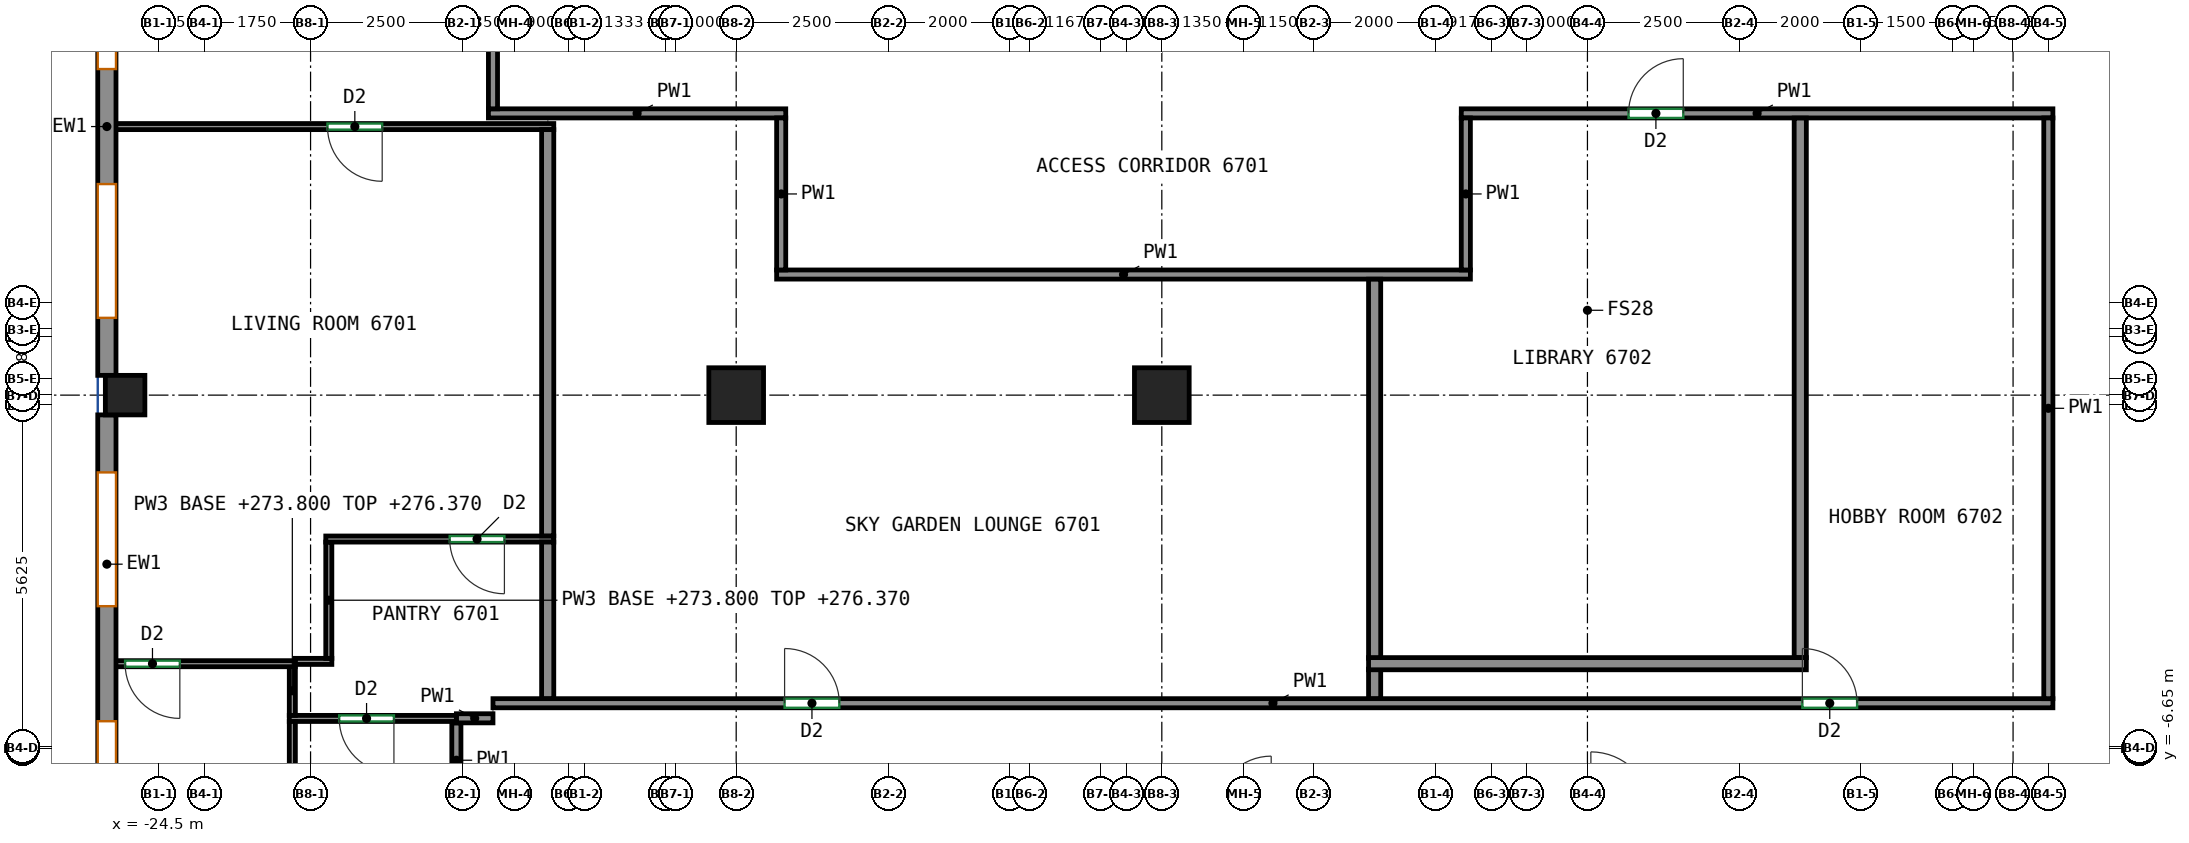
"""IFC4 building model, lengths in metres.
Left out: names, types, materials, properties, quantities, classifications, styles, units other than length and angle.
Written with IfcOpenShell. Run it as: python <this file> out.ifc"""

import sys

from ifc_helpers import new_model, si_unit, direction, frame, frame_2d, origin, origin_2d, place, context, subcontext, project, spatial, rectangle, extrude, source, transform, mapped, element, fill, save


model = new_model("IFC4")
c1 = context("Model", 3, precision=1e-05, world=origin(), true_north=direction((0.0, 1.0)))
c2 = subcontext(c1, "Body", "Model", "MODEL_VIEW")
j1 = project(units=[si_unit("LENGTHUNIT", "METRE"), si_unit("PLANEANGLEUNIT", "RADIAN")], contexts=[c1])
p1 = place(None, origin())
s1 = spatial("IfcSite", under=j1, at=p1, CompositionType="ELEMENT")
p2 = place(p1, origin())
s2 = spatial("IfcBuilding", under=s1, at=p2, CompositionType="ELEMENT")
p3 = place(p2, frame((0.0, 0.0, 273.8)))
s3 = spatial("IfcBuildingStorey", under=s2, at=p3, CompositionType="ELEMENT", Elevation=273.8)
m1 = source(origin(), c2, "Body", "SweptSolid", [
    extrude(rectangle(XDim=0.65, YDim=0.65, at=origin_2d()), origin(), (0.0, 0.0, 1.0), 3.12),
])
p4 = place(p3, frame((-25.05, -0.833, 0.0), z_axis=(0.0, 0.0, 1.0), x_axis=(1.0, 0.0, 0.0)))
e1 = element("IfcColumn", 1, at=p4, inside=s3, PredefinedType="COLUMN", context=c2, shape_type="MappedRepresentation", body=[
    mapped(m1, transform((0.0, 0.0, 0.0))),
])
m2 = source(origin(), c2, "Body", "SweptSolid", [
    extrude(rectangle(XDim=0.9, YDim=0.9, at=origin_2d()), origin(), (0.0, 0.0, 1.0), 3.12),
])
for number, where, z_axis, x_axis in (
    (2, (-15.0, -0.833, 0.0), (0.0, 0.0, 1.0), (1.0, 0.0, 0.0)),
    (3, (-8.0, -0.833, 0.0), (0.0, 0.0, 1.0), (1.0, 0.0, 0.0)),
):
    element("IfcColumn", number, at=place(p3, frame(where, z_axis=z_axis, x_axis=x_axis)), inside=s3, PredefinedType="COLUMN", context=c2, shape_type="MappedRepresentation", body=[
        mapped(m2, transform((0.0, 0.0, 0.0))),
    ])
m3 = source(origin(), c2, "Body", "SweptSolid", [
    extrude(rectangle(XDim=8.183, YDim=0.3, at=frame_2d((4.092, 0.0))), origin(), (0.0, 0.0, 1.0), 3.12),
])
p5 = place(p3, frame((-25.35, 7.675, 0.0), z_axis=(0.0, 0.0, 1.0), x_axis=(0.0, -1.0, 0.0)))
e4 = element("IfcWall", 4, at=p5, inside=s3, PredefinedType="SOLIDWALL", context=c2, shape_type="MappedRepresentation", body=[
    mapped(m3, transform((0.0, 0.0, 0.0))),
])
p6 = place(p5, frame((0.946, 0.0, 0.8)))
e5 = element("IfcOpeningElement", 5, at=p6, cuts=e4, PredefinedType="OPENING", context=c2, shape_type="SweptSolid", body=[
    extrude(rectangle(XDim=2.2, YDim=2.05, at=frame_2d((1.1, 1.025))), frame((0.0, 0.16, 0.0), z_axis=(0.0, -1.0, 0.0), x_axis=(1.0, 0.0, 0.0)), (0.0, 0.0, 1.0), 0.32),
])
p7 = place(p5, frame((5.037, 0.0, 0.8)))
e6 = element("IfcOpeningElement", 6, at=p7, cuts=e4, PredefinedType="OPENING", context=c2, shape_type="SweptSolid", body=[
    extrude(rectangle(XDim=2.2, YDim=2.05, at=frame_2d((1.1, 1.025))), frame((0.0, 0.16, 0.0), z_axis=(0.0, -1.0, 0.0), x_axis=(1.0, 0.0, 0.0)), (0.0, 0.0, 1.0), 0.32),
])
m4 = source(origin(), c2, "Body", "SweptSolid", [
    extrude(rectangle(XDim=8.184, YDim=0.3, at=frame_2d((4.092, 0.0))), origin(), (0.0, 0.0, 1.0), 3.12),
])
p8 = place(p3, frame((-25.35, -1.158, 0.0), z_axis=(0.0, 0.0, 1.0), x_axis=(0.0, -1.0, 0.0)))
e7 = element("IfcWall", 7, at=p8, inside=s3, PredefinedType="SOLIDWALL", context=c2, shape_type="MappedRepresentation", body=[
    mapped(m4, transform((0.0, 0.0, 0.0))),
])
p9 = place(p8, frame((0.946, 0.0, 0.8)))
e8 = element("IfcOpeningElement", 8, at=p9, cuts=e7, PredefinedType="OPENING", context=c2, shape_type="SweptSolid", body=[
    extrude(rectangle(XDim=2.2, YDim=2.05, at=frame_2d((1.1, 1.025))), frame((0.0, 0.16, 0.0), z_axis=(0.0, -1.0, 0.0), x_axis=(1.0, 0.0, 0.0)), (0.0, 0.0, 1.0), 0.32),
])
p10 = place(p8, frame((5.038, 0.0, 0.8)))
e9 = element("IfcOpeningElement", 9, at=p10, cuts=e7, PredefinedType="OPENING", context=c2, shape_type="SweptSolid", body=[
    extrude(rectangle(XDim=2.2, YDim=2.05, at=frame_2d((1.1, 1.025))), frame((0.0, 0.16, 0.0), z_axis=(0.0, -1.0, 0.0), x_axis=(1.0, 0.0, 0.0)), (0.0, 0.0, 1.0), 0.32),
])
p11 = place(p3, frame((-19.602, -7.452, 0.0), z_axis=(0.0, 0.0, 1.0), x_axis=(0.0, 1.0, 0.0)))
e10 = element("IfcWall", 10, at=p11, inside=s3, PredefinedType="PARTITIONING", context=c2, shape_type="SweptSolid", body=[
    extrude(rectangle(XDim=1.229, YDim=0.15, at=frame_2d((0.615, 0.0))), origin(), (0.0, 0.0, 1.0), 3.12),
])
p12 = place(p3, frame((-19.0, -6.148, 0.0), z_axis=(0.0, 0.0, 1.0), x_axis=(-1.0, 0.0, 0.0)))
e11 = element("IfcWall", 11, at=p12, inside=s3, PredefinedType="PARTITIONING", context=c2, shape_type="SweptSolid", body=[
    extrude(rectangle(XDim=0.602, YDim=0.15, at=frame_2d((0.301, 0.0))), origin(), (0.0, 0.0, 1.0), 3.12),
])
p13 = place(p3, frame((-19.0, -5.9, 0.0), z_axis=(0.0, 0.0, 1.0), x_axis=(1.0, 0.0, 0.0)))
e12 = element("IfcWall", 12, at=p13, inside=s3, PredefinedType="PARTITIONING", context=c2, shape_type="SweptSolid", body=[
    extrude(rectangle(XDim=25.655, YDim=0.15, at=frame_2d((12.828, 0.0))), origin(), (0.0, 0.0, 1.0), 3.12),
])
p14 = place(p13, frame((4.796, 0.0, 0.0)))
e13 = element("IfcOpeningElement", 13, at=p14, cuts=e12, PredefinedType="OPENING", context=c2, shape_type="SweptSolid", body=[
    extrude(rectangle(XDim=0.9, YDim=2.1, at=frame_2d((0.45, 1.05))), frame((0.0, 0.085, 0.0), z_axis=(0.0, -1.0, 0.0), x_axis=(1.0, 0.0, 0.0)), (0.0, 0.0, 1.0), 0.17),
])
p15 = place(p13, frame((21.535, 0.0, 0.0)))
e14 = element("IfcOpeningElement", 14, at=p15, cuts=e12, PredefinedType="OPENING", context=c2, shape_type="SweptSolid", body=[
    extrude(rectangle(XDim=0.9, YDim=2.1, at=frame_2d((0.45, 1.05))), frame((0.0, 0.085, 0.0), z_axis=(0.0, -1.0, 0.0), x_axis=(1.0, 0.0, 0.0)), (0.0, 0.0, 1.0), 0.17),
])
p16 = place(p3, frame((-19.075, 3.8, 0.0), z_axis=(0.0, 0.0, 1.0), x_axis=(1.0, 0.0, 0.0)))
e15 = element("IfcWall", 15, at=p16, inside=s3, PredefinedType="PARTITIONING", context=c2, shape_type="SweptSolid", body=[
    extrude(rectangle(XDim=4.89, YDim=0.15, at=frame_2d((2.445, 0.0))), origin(), (0.0, 0.0, 1.0), 3.12),
])
p17 = place(p3, frame((-19.0, 3.875, 0.0), z_axis=(0.0, 0.0, 1.0), x_axis=(0.0, 1.0, 0.0)))
e16 = element("IfcWall", 16, at=p17, inside=s3, PredefinedType="PARTITIONING", context=c2, shape_type="SweptSolid", body=[
    extrude(rectangle(XDim=4.035, YDim=0.15, at=frame_2d((2.018, 0.0))), origin(), (0.0, 0.0, 1.0), 3.12),
])
p18 = place(p3, frame((-14.335, 1.15, 0.0), z_axis=(0.0, 0.0, 1.0), x_axis=(1.0, 0.0, 0.0)))
e17 = element("IfcWall", 17, at=p18, inside=s3, PredefinedType="PARTITIONING", context=c2, shape_type="SweptSolid", body=[
    extrude(rectangle(XDim=11.41, YDim=0.15, at=frame_2d((5.705, 0.0))), origin(), (0.0, 0.0, 1.0), 3.12),
])
p19 = place(p3, frame((-14.26, 3.725, 0.0), z_axis=(0.0, 0.0, 1.0), x_axis=(0.0, -1.0, 0.0)))
e18 = element("IfcWall", 18, at=p19, inside=s3, PredefinedType="PARTITIONING", context=c2, shape_type="SweptSolid", body=[
    extrude(rectangle(XDim=2.5, YDim=0.15, at=frame_2d((1.25, 0.0))), origin(), (0.0, 0.0, 1.0), 3.12),
])
p20 = place(p3, frame((-3.075, 3.8, 0.0), z_axis=(0.0, 0.0, 1.0), x_axis=(1.0, 0.0, 0.0)))
e19 = element("IfcWall", 19, at=p20, inside=s3, PredefinedType="PARTITIONING", context=c2, shape_type="SweptSolid", body=[
    extrude(rectangle(XDim=9.73, YDim=0.15, at=frame_2d((4.865, 0.0))), origin(), (0.0, 0.0, 1.0), 3.12),
])
p21 = place(p20, frame((2.751, 0.0, 0.0)))
e20 = element("IfcOpeningElement", 20, at=p21, cuts=e19, PredefinedType="OPENING", context=c2, shape_type="SweptSolid", body=[
    extrude(rectangle(XDim=0.9, YDim=2.1, at=frame_2d((0.45, 1.05))), frame((0.0, 0.085, 0.0), z_axis=(0.0, -1.0, 0.0), x_axis=(1.0, 0.0, 0.0)), (0.0, 0.0, 1.0), 0.17),
])
p22 = place(p3, frame((-3.0, 1.225, 0.0), z_axis=(0.0, 0.0, 1.0), x_axis=(0.0, 1.0, 0.0)))
e21 = element("IfcWall", 21, at=p22, inside=s3, PredefinedType="PARTITIONING", context=c2, shape_type="SweptSolid", body=[
    extrude(rectangle(XDim=2.5, YDim=0.15, at=frame_2d((1.25, 0.0))), origin(), (0.0, 0.0, 1.0), 3.12),
])
p23 = place(p3, frame((6.58, 3.725, 0.0), z_axis=(0.0, 0.0, 1.0), x_axis=(0.0, -1.0, 0.0)))
e22 = element("IfcWall", 22, at=p23, inside=s3, PredefinedType="PARTITIONING", context=c2, shape_type="SweptSolid", body=[
    extrude(rectangle(XDim=9.55, YDim=0.15, at=frame_2d((4.775, 0.0))), origin(), (0.0, 0.0, 1.0), 3.12),
])
p24 = place(p3, frame((-19.602, -6.15, 0.0), z_axis=(0.0, 0.0, 1.0), x_axis=(-1.0, 0.0, 0.0)))
e23 = element("IfcWall", 23, at=p24, inside=s3, PredefinedType="PARTITIONING", context=c2, shape_type="SweptSolid", body=[
    extrude(rectangle(XDim=2.748, YDim=0.1, at=frame_2d((1.374, 0.0))), origin(), (0.0, 0.0, 1.0), 3.12),
])
p25 = place(p24, frame((1.027, 0.0, 0.0)))
e24 = element("IfcOpeningElement", 24, at=p25, cuts=e23, PredefinedType="OPENING", context=c2, shape_type="SweptSolid", body=[
    extrude(rectangle(XDim=0.9, YDim=2.1, at=frame_2d((0.45, 1.05))), frame((0.0, 0.06, 0.0), z_axis=(0.0, -1.0, 0.0), x_axis=(1.0, 0.0, 0.0)), (0.0, 0.0, 1.0), 0.12),
])
p26 = place(p3, frame((-22.3, -9.05, 0.0), z_axis=(0.0, 0.0, 1.0), x_axis=(0.0, 1.0, 0.0)))
e25 = element("IfcWall", 25, at=p26, inside=s3, PredefinedType="PARTITIONING", context=c2, shape_type="SweptSolid", body=[
    extrude(rectangle(XDim=2.85, YDim=0.1, at=frame_2d((1.425, 0.0))), origin(), (0.0, 0.0, 1.0), 2.57),
])
p27 = place(p3, frame((-22.3, -6.1, 0.0), z_axis=(0.0, 0.0, 1.0), x_axis=(0.0, 1.0, 0.0)))
e26 = element("IfcWall", 26, at=p27, inside=s3, PredefinedType="PARTITIONING", context=c2, shape_type="SweptSolid", body=[
    extrude(rectangle(XDim=0.81, YDim=0.1, at=frame_2d((0.405, 0.0))), origin(), (0.0, 0.0, 1.0), 2.57),
])
p28 = place(p3, frame((-21.65, -5.212, 0.0), z_axis=(0.0, 0.0, 1.0), x_axis=(-1.0, 0.0, 0.0)))
e27 = element("IfcWall", 27, at=p28, inside=s3, PredefinedType="PARTITIONING", context=c2, shape_type="SweptSolid", body=[
    extrude(rectangle(XDim=0.602, YDim=0.1, at=frame_2d((0.301, 0.0))), origin(), (0.0, 0.0, 1.0), 3.12),
])
p29 = place(p3, frame((-21.7, -5.162, 0.0), z_axis=(0.0, 0.0, 1.0), x_axis=(0.0, 1.0, 0.0)))
e28 = element("IfcWall", 28, at=p29, inside=s3, PredefinedType="PARTITIONING", context=c2, shape_type="SweptSolid", body=[
    extrude(rectangle(XDim=1.912, YDim=0.1, at=frame_2d((0.956, 0.0))), origin(), (0.0, 0.0, 1.0), 2.57),
])
p30 = place(p3, frame((-18.0, -3.2, 0.0), z_axis=(0.0, 0.0, 1.0), x_axis=(-1.0, 0.0, 0.0)))
e29 = element("IfcWall", 29, at=p30, inside=s3, PredefinedType="PARTITIONING", context=c2, shape_type="SweptSolid", body=[
    extrude(rectangle(XDim=3.75, YDim=0.1, at=frame_2d((1.875, 0.0))), origin(), (0.0, 0.0, 1.0), 3.12),
])
p31 = place(p30, frame((0.812, 0.0, 0.0)))
e30 = element("IfcOpeningElement", 30, at=p31, cuts=e29, PredefinedType="OPENING", context=c2, shape_type="SweptSolid", body=[
    extrude(rectangle(XDim=0.9, YDim=2.1, at=frame_2d((0.45, 1.05))), frame((0.0, 0.06, 0.0), z_axis=(0.0, -1.0, 0.0), x_axis=(1.0, 0.0, 0.0)), (0.0, 0.0, 1.0), 0.12),
])
p32 = place(p3, frame((-18.1, -5.823, 0.0), z_axis=(0.0, 0.0, 1.0), x_axis=(0.0, 1.0, 0.0)))
e31 = element("IfcWall", 31, at=p32, inside=s3, PredefinedType="PARTITIONING", context=c2, shape_type="SweptSolid", body=[
    extrude(rectangle(XDim=2.573, YDim=0.2, at=frame_2d((1.287, 0.0))), origin(), (0.0, 0.0, 1.0), 3.12),
])
p33 = place(p3, frame((-22.252, -5.25, 0.0), z_axis=(0.0, 0.0, 1.0), x_axis=(-1.0, 0.0, 0.0)))
e32 = element("IfcWall", 32, at=p33, inside=s3, PredefinedType="PARTITIONING", context=c2, shape_type="SweptSolid", body=[
    extrude(rectangle(XDim=2.998, YDim=0.1, at=frame_2d((1.499, 0.0))), origin(), (0.0, 0.0, 1.0), 3.12),
])
p34 = place(p33, frame((1.898, 0.0, 0.0)))
e33 = element("IfcOpeningElement", 33, at=p34, cuts=e32, PredefinedType="OPENING", context=c2, shape_type="SweptSolid", body=[
    extrude(rectangle(XDim=0.9, YDim=2.1, at=frame_2d((0.45, 1.05))), frame((0.0, 0.06, 0.0), z_axis=(0.0, -1.0, 0.0), x_axis=(1.0, 0.0, 0.0)), (0.0, 0.0, 1.0), 0.12),
])
p35 = place(p3, frame((-18.0, 3.583, 0.0), z_axis=(0.0, 0.0, 1.0), x_axis=(-1.0, 0.0, 0.0)))
e34 = element("IfcWall", 34, at=p35, inside=s3, PredefinedType="PARTITIONING", context=c2, shape_type="SweptSolid", body=[
    extrude(rectangle(XDim=7.25, YDim=0.1, at=frame_2d((3.625, 0.0))), origin(), (0.0, 0.0, 1.0), 3.12),
])
p36 = place(p35, frame((2.822, 0.0, 0.0)))
e35 = element("IfcOpeningElement", 35, at=p36, cuts=e34, PredefinedType="OPENING", context=c2, shape_type="SweptSolid", body=[
    extrude(rectangle(XDim=0.9, YDim=2.1, at=frame_2d((0.45, 1.05))), frame((0.0, 0.06, 0.0), z_axis=(0.0, -1.0, 0.0), x_axis=(1.0, 0.0, 0.0)), (0.0, 0.0, 1.0), 0.12),
])
p37 = place(p3, frame((-18.1, -3.148, 0.0), z_axis=(0.0, 0.0, 1.0), x_axis=(0.0, 1.0, 0.0)))
e36 = element("IfcWall", 36, at=p37, inside=s3, PredefinedType="PARTITIONING", context=c2, shape_type="SweptSolid", body=[
    extrude(rectangle(XDim=6.681, YDim=0.2, at=frame_2d((3.34, 0.0))), origin(), (0.0, 0.0, 1.0), 3.12),
])
p38 = place(p3, frame((-4.5, -5.16, 0.0), z_axis=(0.0, 0.0, 1.0), x_axis=(0.0, 1.0, 0.0)))
e37 = element("IfcWall", 37, at=p38, inside=s3, PredefinedType="PARTITIONING", context=c2, shape_type="SweptSolid", body=[
    extrude(rectangle(XDim=6.233, YDim=0.2, at=frame_2d((3.116, 0.0))), origin(), (0.0, 0.0, 1.0), 3.12),
])
p39 = place(p3, frame((-4.5, -5.823, 0.0), z_axis=(0.0, 0.0, 1.0), x_axis=(0.0, 1.0, 0.0)))
e38 = element("IfcWall", 38, at=p39, inside=s3, PredefinedType="PARTITIONING", context=c2, shape_type="SweptSolid", body=[
    extrude(rectangle(XDim=0.483, YDim=0.2, at=frame_2d((0.241, 0.0))), origin(), (0.0, 0.0, 1.0), 3.12),
])
p40 = place(p3, frame((2.5, -5.15, 0.0), z_axis=(0.0, 0.0, 1.0), x_axis=(0.0, 1.0, 0.0)))
e39 = element("IfcWall", 39, at=p40, inside=s3, PredefinedType="PARTITIONING", context=c2, shape_type="SweptSolid", body=[
    extrude(rectangle(XDim=8.873, YDim=0.2, at=frame_2d((4.437, 0.0))), origin(), (0.0, 0.0, 1.0), 3.12),
])
p41 = place(p3, frame((-4.6, -5.25, 0.0), z_axis=(0.0, 0.0, 1.0), x_axis=(1.0, 0.0, 0.0)))
e40 = element("IfcWall", 40, at=p41, inside=s3, PredefinedType="PARTITIONING", context=c2, shape_type="SweptSolid", body=[
    extrude(rectangle(XDim=7.2, YDim=0.2, at=frame_2d((3.6, 0.0))), origin(), (0.0, 0.0, 1.0), 3.12),
])
p42 = place(p6, origin())
e41 = element("IfcWindow", 41, at=p42, inside=s3, PartitioningType="SINGLE_PANEL", PredefinedType="WINDOW", context=c2, shape_type="SweptSolid", body=[
    extrude(rectangle(XDim=2.2, YDim=2.05, at=frame_2d((1.1, 1.025))), frame((0.0, 0.03, 0.0), z_axis=(0.0, -1.0, 0.0), x_axis=(1.0, 0.0, 0.0)), (0.0, 0.0, 1.0), 0.06),
])
fill(e5, e41)
p43 = place(p7, origin())
e42 = element("IfcWindow", 42, at=p43, inside=s3, PartitioningType="SINGLE_PANEL", PredefinedType="WINDOW", context=c2, shape_type="SweptSolid", body=[
    extrude(rectangle(XDim=2.2, YDim=2.05, at=frame_2d((1.1, 1.025))), frame((0.0, 0.03, 0.0), z_axis=(0.0, -1.0, 0.0), x_axis=(1.0, 0.0, 0.0)), (0.0, 0.0, 1.0), 0.06),
])
fill(e6, e42)
p44 = place(p9, origin())
e43 = element("IfcWindow", 43, at=p44, inside=s3, PartitioningType="SINGLE_PANEL", PredefinedType="WINDOW", context=c2, shape_type="SweptSolid", body=[
    extrude(rectangle(XDim=2.2, YDim=2.05, at=frame_2d((1.1, 1.025))), frame((0.0, 0.03, 0.0), z_axis=(0.0, -1.0, 0.0), x_axis=(1.0, 0.0, 0.0)), (0.0, 0.0, 1.0), 0.06),
])
fill(e8, e43)
p45 = place(p10, origin())
e44 = element("IfcWindow", 44, at=p45, inside=s3, PartitioningType="SINGLE_PANEL", PredefinedType="WINDOW", context=c2, shape_type="SweptSolid", body=[
    extrude(rectangle(XDim=2.2, YDim=2.05, at=frame_2d((1.1, 1.025))), frame((0.0, 0.03, 0.0), z_axis=(0.0, -1.0, 0.0), x_axis=(1.0, 0.0, 0.0)), (0.0, 0.0, 1.0), 0.06),
])
fill(e9, e44)
p46 = place(p25, origin())
e45 = element("IfcDoor", 45, at=p46, inside=s3, OperationType="SINGLE_SWING_LEFT", PredefinedType="DOOR", context=c2, shape_type="SweptSolid", body=[
    extrude(rectangle(XDim=0.9, YDim=2.1, at=frame_2d((0.45, 1.05))), frame((0.0, 0.025, 0.0), z_axis=(0.0, -1.0, 0.0), x_axis=(1.0, 0.0, 0.0)), (0.0, 0.0, 1.0), 0.05),
])
fill(e24, e45)
p47 = place(p14, origin())
e46 = element("IfcDoor", 46, at=p47, inside=s3, OperationType="SINGLE_SWING_LEFT", PredefinedType="DOOR", context=c2, shape_type="SweptSolid", body=[
    extrude(rectangle(XDim=0.9, YDim=2.1, at=frame_2d((0.45, 1.05))), frame((0.0, 0.025, 0.0), z_axis=(0.0, -1.0, 0.0), x_axis=(1.0, 0.0, 0.0)), (0.0, 0.0, 1.0), 0.05),
])
fill(e13, e46)
p48 = place(p15, origin())
e47 = element("IfcDoor", 47, at=p48, inside=s3, OperationType="SINGLE_SWING_LEFT", PredefinedType="DOOR", context=c2, shape_type="SweptSolid", body=[
    extrude(rectangle(XDim=0.9, YDim=2.1, at=frame_2d((0.45, 1.05))), frame((0.0, 0.025, 0.0), z_axis=(0.0, -1.0, 0.0), x_axis=(1.0, 0.0, 0.0)), (0.0, 0.0, 1.0), 0.05),
])
fill(e14, e47)
p49 = place(p34, origin())
e48 = element("IfcDoor", 48, at=p49, inside=s3, OperationType="SINGLE_SWING_LEFT", PredefinedType="DOOR", context=c2, shape_type="SweptSolid", body=[
    extrude(rectangle(XDim=0.9, YDim=2.1, at=frame_2d((0.45, 1.05))), frame((0.0, 0.025, 0.0), z_axis=(0.0, -1.0, 0.0), x_axis=(1.0, 0.0, 0.0)), (0.0, 0.0, 1.0), 0.05),
])
fill(e33, e48)
p50 = place(p31, origin())
e49 = element("IfcDoor", 49, at=p50, inside=s3, OperationType="SINGLE_SWING_LEFT", PredefinedType="DOOR", context=c2, shape_type="SweptSolid", body=[
    extrude(rectangle(XDim=0.9, YDim=2.1, at=frame_2d((0.45, 1.05))), frame((0.0, 0.025, 0.0), z_axis=(0.0, -1.0, 0.0), x_axis=(1.0, 0.0, 0.0)), (0.0, 0.0, 1.0), 0.05),
])
fill(e30, e49)
p51 = place(p36, origin())
e50 = element("IfcDoor", 50, at=p51, inside=s3, OperationType="SINGLE_SWING_LEFT", PredefinedType="DOOR", context=c2, shape_type="SweptSolid", body=[
    extrude(rectangle(XDim=0.9, YDim=2.1, at=frame_2d((0.45, 1.05))), frame((0.0, 0.025, 0.0), z_axis=(0.0, -1.0, 0.0), x_axis=(1.0, 0.0, 0.0)), (0.0, 0.0, 1.0), 0.05),
])
fill(e35, e50)
p52 = place(p21, origin())
e51 = element("IfcDoor", 51, at=p52, inside=s3, OperationType="SINGLE_SWING_RIGHT", PredefinedType="DOOR", context=c2, shape_type="SweptSolid", body=[
    extrude(rectangle(XDim=0.9, YDim=2.1, at=frame_2d((0.45, 1.05))), frame((0.0, 0.025, 0.0), z_axis=(0.0, -1.0, 0.0), x_axis=(1.0, 0.0, 0.0)), (0.0, 0.0, 1.0), 0.05),
])
fill(e20, e51)
save(model, sys.argv[1])
